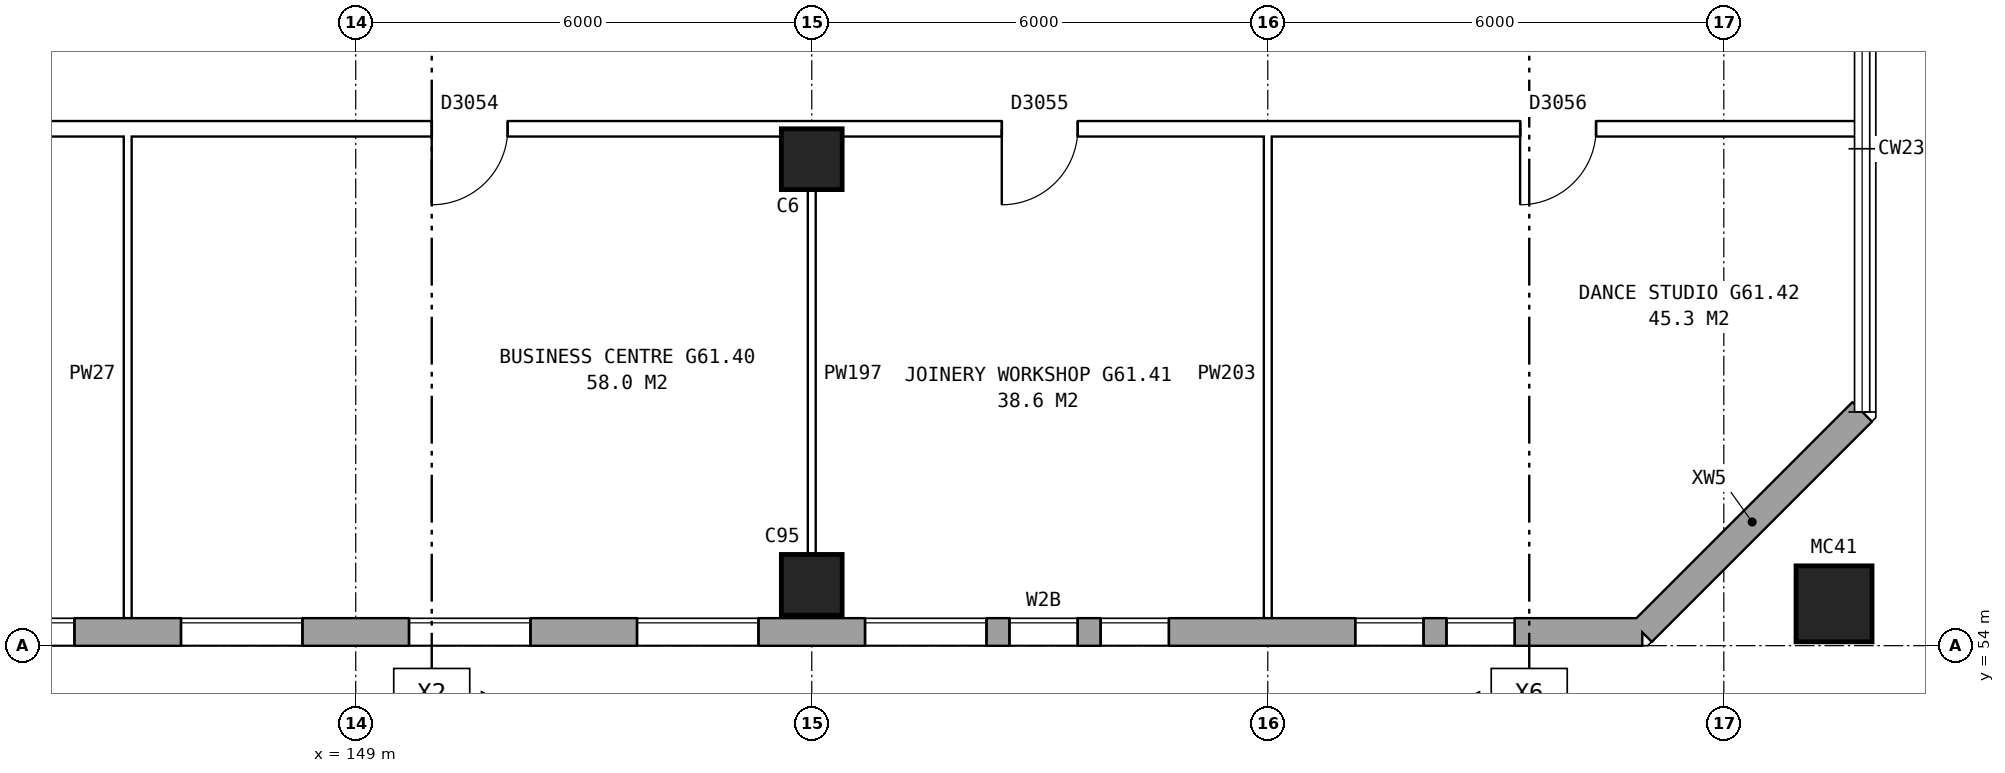
"""IFC4 building model, lengths in metres.
Left out: names, types, materials, properties, quantities, classifications, styles, units other than length and angle.
Written with IfcOpenShell. Run it as: python <this file> out.ifc"""

import sys

from ifc_helpers import new_model, si_unit, direction, frame, frame_2d, origin, origin_2d, place, context, subcontext, project, spatial, rectangle, hollow_rectangle, extrude, element, fill, save


model = new_model("IFC4")
c1 = context("Model", 3, precision=1e-05, world=origin(), true_north=direction((0.0, 1.0)))
c2 = subcontext(c1, "Body", "Model", "MODEL_VIEW")
j1 = project(units=[si_unit("LENGTHUNIT", "METRE"), si_unit("PLANEANGLEUNIT", "RADIAN")], contexts=[c1])
p1 = place(None, origin())
s1 = spatial("IfcSite", under=j1, at=p1, CompositionType="ELEMENT")
p2 = place(p1, origin())
s2 = spatial("IfcBuilding", under=s1, at=p2, CompositionType="ELEMENT")
p3 = place(p2, frame((0.0, 0.0, 215.2)))
s3 = spatial("IfcBuildingStorey", under=s2, at=p3, CompositionType="ELEMENT", Elevation=215.2)
for number, where, z_axis, x_axis in (
    (1, (155.0, 54.8, 0.0), (0.0, 0.0, 1.0), (1.0, 0.0, 0.0)),
    (2, (155.0, 60.4, 0.0), (0.0, 0.0, 1.0), (1.0, 0.0, 0.0)),
):
    element("IfcColumn", number, at=place(p3, frame(where, z_axis=z_axis, x_axis=x_axis)), inside=s3, PredefinedType="COLUMN", context=c2, shape_type="SweptSolid", body=[
        extrude(rectangle(XDim=0.8, YDim=0.8, at=origin_2d()), origin(), (0.0, 0.0, 1.0), 5.6),
    ])
p4 = place(p3, frame((168.45, 54.55, 0.0), z_axis=(0.0, 0.0, 1.0), x_axis=(1.0, 0.0, 0.0)))
e3 = element("IfcColumn", 3, at=p4, inside=s3, PredefinedType="COLUMN", context=c2, shape_type="SweptSolid", body=[
    extrude(hollow_rectangle(XDim=1.0, YDim=1.0, WallThickness=0.055, at=origin_2d()), origin(), (0.0, 0.0, 1.0), 6.2),
])
p5 = place(p3, frame((132.05, 54.18, 0.0), z_axis=(0.0, 0.0, 1.0), x_axis=(1.0, 0.0, 0.0)))
e4 = element("IfcWall", 4, at=p5, inside=s3, PredefinedType="STANDARD", context=c2, shape_type="SweptSolid", body=[
    extrude(rectangle(XDim=33.875, YDim=0.36, at=frame_2d((16.938, 0.0))), origin(), (0.0, 0.0, 1.0), 5.6),
])
p6 = place(p5, frame((2.65, 0.0, 0.15)))
e5 = element("IfcOpeningElement", 5, at=p6, cuts=e4, PredefinedType="OPENING", context=c2, shape_type="SweptSolid", body=[
    extrude(rectangle(XDim=1.6, YDim=2.4, at=frame_2d((0.8, 1.2))), frame((0.0, 0.19, 0.0), z_axis=(0.0, -1.0, 0.0), x_axis=(1.0, 0.0, 0.0)), (0.0, 0.0, 1.0), 0.38),
])
p7 = place(p5, frame((8.65, 0.0, 0.15)))
e6 = element("IfcOpeningElement", 6, at=p7, cuts=e4, PredefinedType="OPENING", context=c2, shape_type="SweptSolid", body=[
    extrude(rectangle(XDim=1.6, YDim=2.4, at=frame_2d((0.8, 1.2))), frame((0.0, 0.19, 0.0), z_axis=(0.0, -1.0, 0.0), x_axis=(1.0, 0.0, 0.0)), (0.0, 0.0, 1.0), 0.38),
])
p8 = place(p5, frame((11.65, 0.0, 0.15)))
e7 = element("IfcOpeningElement", 7, at=p8, cuts=e4, PredefinedType="OPENING", context=c2, shape_type="SweptSolid", body=[
    extrude(rectangle(XDim=1.6, YDim=2.4, at=frame_2d((0.8, 1.2))), frame((0.0, 0.19, 0.0), z_axis=(0.0, -1.0, 0.0), x_axis=(1.0, 0.0, 0.0)), (0.0, 0.0, 1.0), 0.38),
])
p9 = place(p5, frame((14.65, 0.0, 0.15)))
e8 = element("IfcOpeningElement", 8, at=p9, cuts=e4, PredefinedType="OPENING", context=c2, shape_type="SweptSolid", body=[
    extrude(rectangle(XDim=1.6, YDim=2.4, at=frame_2d((0.8, 1.2))), frame((0.0, 0.19, 0.0), z_axis=(0.0, -1.0, 0.0), x_axis=(1.0, 0.0, 0.0)), (0.0, 0.0, 1.0), 0.38),
])
p10 = place(p5, frame((17.65, 0.0, 0.15)))
e9 = element("IfcOpeningElement", 9, at=p10, cuts=e4, PredefinedType="OPENING", context=c2, shape_type="SweptSolid", body=[
    extrude(rectangle(XDim=1.6, YDim=2.4, at=frame_2d((0.8, 1.2))), frame((0.0, 0.19, 0.0), z_axis=(0.0, -1.0, 0.0), x_axis=(1.0, 0.0, 0.0)), (0.0, 0.0, 1.0), 0.38),
])
p11 = place(p5, frame((20.65, 0.0, 0.15)))
e10 = element("IfcOpeningElement", 10, at=p11, cuts=e4, PredefinedType="OPENING", context=c2, shape_type="SweptSolid", body=[
    extrude(rectangle(XDim=1.6, YDim=2.4, at=frame_2d((0.8, 1.2))), frame((0.0, 0.19, 0.0), z_axis=(0.0, -1.0, 0.0), x_axis=(1.0, 0.0, 0.0)), (0.0, 0.0, 1.0), 0.38),
])
p12 = place(p5, frame((23.65, 0.0, 0.15)))
e11 = element("IfcOpeningElement", 11, at=p12, cuts=e4, PredefinedType="OPENING", context=c2, shape_type="SweptSolid", body=[
    extrude(rectangle(XDim=1.6, YDim=2.4, at=frame_2d((0.8, 1.2))), frame((0.0, 0.19, 0.0), z_axis=(0.0, -1.0, 0.0), x_axis=(1.0, 0.0, 0.0)), (0.0, 0.0, 1.0), 0.38),
])
p13 = place(p5, frame((25.55, 0.0, 0.15)))
e12 = element("IfcOpeningElement", 12, at=p13, cuts=e4, PredefinedType="OPENING", context=c2, shape_type="SweptSolid", body=[
    extrude(rectangle(XDim=0.9, YDim=2.4, at=frame_2d((0.45, 1.2))), frame((0.0, 0.19, 0.0), z_axis=(0.0, -1.0, 0.0), x_axis=(1.0, 0.0, 0.0)), (0.0, 0.0, 1.0), 0.38),
])
p14 = place(p5, frame((30.1, 0.0, 0.15)))
e13 = element("IfcOpeningElement", 13, at=p14, cuts=e4, PredefinedType="OPENING", context=c2, shape_type="SweptSolid", body=[
    extrude(rectangle(XDim=0.9, YDim=2.4, at=frame_2d((0.45, 1.2))), frame((0.0, 0.19, 0.0), z_axis=(0.0, -1.0, 0.0), x_axis=(1.0, 0.0, 0.0)), (0.0, 0.0, 1.0), 0.38),
])
p15 = place(p5, frame((26.75, 0.0, 0.15)))
e14 = element("IfcOpeningElement", 14, at=p15, cuts=e4, PredefinedType="OPENING", context=c2, shape_type="SweptSolid", body=[
    extrude(rectangle(XDim=0.9, YDim=2.4, at=frame_2d((0.45, 1.2))), frame((0.0, 0.19, 0.0), z_axis=(0.0, -1.0, 0.0), x_axis=(1.0, 0.0, 0.0)), (0.0, 0.0, 1.0), 0.38),
])
p16 = place(p5, frame((31.3, 0.0, 0.15)))
e15 = element("IfcOpeningElement", 15, at=p16, cuts=e4, PredefinedType="OPENING", context=c2, shape_type="SweptSolid", body=[
    extrude(rectangle(XDim=0.9, YDim=2.4, at=frame_2d((0.45, 1.2))), frame((0.0, 0.19, 0.0), z_axis=(0.0, -1.0, 0.0), x_axis=(1.0, 0.0, 0.0)), (0.0, 0.0, 1.0), 0.38),
])
p17 = place(p3, frame((165.925, 54.18, 0.0), z_axis=(0.0, 0.0, 1.0), x_axis=(0.707106781187, 0.707106781187, 0.0)))
e16 = element("IfcWall", 16, at=p17, inside=s3, PredefinedType="STANDARD", context=c2, shape_type="SweptSolid", body=[
    extrude(rectangle(XDim=4.094, YDim=0.36, at=frame_2d((2.047, 0.0))), origin(), (0.0, 0.0, 1.0), 5.6),
])
p18 = place(p3, frame((32.24, 60.8, 0.0), z_axis=(0.0, 0.0, 1.0), x_axis=(1.0, 0.0, 0.0)))
e17 = element("IfcWall", 17, at=p18, inside=s3, PredefinedType="PARTITIONING", context=c2, shape_type="SweptSolid", body=[
    extrude(rectangle(XDim=136.52, YDim=0.2, at=frame_2d((68.26, 0.0))), origin(), (0.0, 0.0, 1.0), 5.6),
])
p19 = place(p18, frame((3.44, 0.0, 0.0)))
e18 = element("IfcOpeningElement", 18, at=p19, cuts=e17, PredefinedType="OPENING", context=c2, shape_type="SweptSolid", body=[
    extrude(rectangle(XDim=1.0, YDim=2.1, at=frame_2d((0.5, 1.05))), frame((0.0, 0.11, 0.0), z_axis=(0.0, -1.0, 0.0), x_axis=(1.0, 0.0, 0.0)), (0.0, 0.0, 1.0), 0.22),
])
p20 = place(p18, frame((11.76, 0.0, 0.0)))
e19 = element("IfcOpeningElement", 19, at=p20, cuts=e17, PredefinedType="OPENING", context=c2, shape_type="SweptSolid", body=[
    extrude(rectangle(XDim=1.0, YDim=2.1, at=frame_2d((0.5, 1.05))), frame((0.0, 0.11, 0.0), z_axis=(0.0, -1.0, 0.0), x_axis=(1.0, 0.0, 0.0)), (0.0, 0.0, 1.0), 0.22),
])
p21 = place(p18, frame((20.76, 0.0, 0.0)))
e20 = element("IfcOpeningElement", 20, at=p21, cuts=e17, PredefinedType="OPENING", context=c2, shape_type="SweptSolid", body=[
    extrude(rectangle(XDim=1.0, YDim=2.1, at=frame_2d((0.5, 1.05))), frame((0.0, 0.11, 0.0), z_axis=(0.0, -1.0, 0.0), x_axis=(1.0, 0.0, 0.0)), (0.0, 0.0, 1.0), 0.22),
])
p22 = place(p18, frame((29.76, 0.0, 0.0)))
e21 = element("IfcOpeningElement", 21, at=p22, cuts=e17, PredefinedType="OPENING", context=c2, shape_type="SweptSolid", body=[
    extrude(rectangle(XDim=1.0, YDim=2.1, at=frame_2d((0.5, 1.05))), frame((0.0, 0.11, 0.0), z_axis=(0.0, -1.0, 0.0), x_axis=(1.0, 0.0, 0.0)), (0.0, 0.0, 1.0), 0.22),
])
p23 = place(p18, frame((38.58, 0.0, 0.0)))
e22 = element("IfcOpeningElement", 22, at=p23, cuts=e17, PredefinedType="OPENING", context=c2, shape_type="SweptSolid", body=[
    extrude(rectangle(XDim=1.0, YDim=2.1, at=frame_2d((0.5, 1.05))), frame((0.0, 0.11, 0.0), z_axis=(0.0, -1.0, 0.0), x_axis=(1.0, 0.0, 0.0)), (0.0, 0.0, 1.0), 0.22),
])
p24 = place(p18, frame((49.955, 0.0, 0.0)))
e23 = element("IfcOpeningElement", 23, at=p24, cuts=e17, PredefinedType="OPENING", context=c2, shape_type="SweptSolid", body=[
    extrude(rectangle(XDim=1.0, YDim=2.1, at=frame_2d((0.5, 1.05))), frame((0.0, 0.11, 0.0), z_axis=(0.0, -1.0, 0.0), x_axis=(1.0, 0.0, 0.0)), (0.0, 0.0, 1.0), 0.22),
])
p25 = place(p18, frame((63.885, 0.0, 0.0)))
e24 = element("IfcOpeningElement", 24, at=p25, cuts=e17, PredefinedType="OPENING", context=c2, shape_type="SweptSolid", body=[
    extrude(rectangle(XDim=1.0, YDim=2.1, at=frame_2d((0.5, 1.05))), frame((0.0, 0.11, 0.0), z_axis=(0.0, -1.0, 0.0), x_axis=(1.0, 0.0, 0.0)), (0.0, 0.0, 1.0), 0.22),
])
p26 = place(p18, frame((77.635, 0.0, 0.0)))
e25 = element("IfcOpeningElement", 25, at=p26, cuts=e17, PredefinedType="OPENING", context=c2, shape_type="SweptSolid", body=[
    extrude(rectangle(XDim=1.0, YDim=2.1, at=frame_2d((0.5, 1.05))), frame((0.0, 0.11, 0.0), z_axis=(0.0, -1.0, 0.0), x_axis=(1.0, 0.0, 0.0)), (0.0, 0.0, 1.0), 0.22),
])
p27 = place(p18, frame((91.565, 0.0, 0.0)))
e26 = element("IfcOpeningElement", 26, at=p27, cuts=e17, PredefinedType="OPENING", context=c2, shape_type="SweptSolid", body=[
    extrude(rectangle(XDim=1.0, YDim=2.1, at=frame_2d((0.5, 1.05))), frame((0.0, 0.11, 0.0), z_axis=(0.0, -1.0, 0.0), x_axis=(1.0, 0.0, 0.0)), (0.0, 0.0, 1.0), 0.22),
])
p28 = place(p18, frame((101.44, 0.0, 0.0)))
e27 = element("IfcOpeningElement", 27, at=p28, cuts=e17, PredefinedType="OPENING", context=c2, shape_type="SweptSolid", body=[
    extrude(rectangle(XDim=1.0, YDim=2.1, at=frame_2d((0.5, 1.05))), frame((0.0, 0.11, 0.0), z_axis=(0.0, -1.0, 0.0), x_axis=(1.0, 0.0, 0.0)), (0.0, 0.0, 1.0), 0.22),
])
p29 = place(p18, frame((108.76, 0.0, 0.0)))
e28 = element("IfcOpeningElement", 28, at=p29, cuts=e17, PredefinedType="OPENING", context=c2, shape_type="SweptSolid", body=[
    extrude(rectangle(XDim=1.0, YDim=2.1, at=frame_2d((0.5, 1.05))), frame((0.0, 0.11, 0.0), z_axis=(0.0, -1.0, 0.0), x_axis=(1.0, 0.0, 0.0)), (0.0, 0.0, 1.0), 0.22),
])
p30 = place(p18, frame((117.76, 0.0, 0.0)))
e29 = element("IfcOpeningElement", 29, at=p30, cuts=e17, PredefinedType="OPENING", context=c2, shape_type="SweptSolid", body=[
    extrude(rectangle(XDim=1.0, YDim=2.1, at=frame_2d((0.5, 1.05))), frame((0.0, 0.11, 0.0), z_axis=(0.0, -1.0, 0.0), x_axis=(1.0, 0.0, 0.0)), (0.0, 0.0, 1.0), 0.22),
])
p31 = place(p18, frame((125.26, 0.0, 0.0)))
e30 = element("IfcOpeningElement", 30, at=p31, cuts=e17, PredefinedType="OPENING", context=c2, shape_type="SweptSolid", body=[
    extrude(rectangle(XDim=1.0, YDim=2.1, at=frame_2d((0.5, 1.05))), frame((0.0, 0.11, 0.0), z_axis=(0.0, -1.0, 0.0), x_axis=(1.0, 0.0, 0.0)), (0.0, 0.0, 1.0), 0.22),
])
p32 = place(p18, frame((132.08, 0.0, 0.0)))
e31 = element("IfcOpeningElement", 31, at=p32, cuts=e17, PredefinedType="OPENING", context=c2, shape_type="SweptSolid", body=[
    extrude(rectangle(XDim=1.0, YDim=2.1, at=frame_2d((0.5, 1.05))), frame((0.0, 0.11, 0.0), z_axis=(0.0, -1.0, 0.0), x_axis=(1.0, 0.0, 0.0)), (0.0, 0.0, 1.0), 0.22),
])
for number, where, z_axis, x_axis in (
    (32, (146.0, 54.24, 0.0), (0.0, 0.0, 1.0), (0.0, 1.0, 0.0)),
    (33, (155.0, 54.24, 0.0), (0.0, 0.0, 1.0), (0.0, 1.0, 0.0)),
    (34, (161.0, 54.24, 0.0), (0.0, 0.0, 1.0), (0.0, 1.0, 0.0)),
):
    element("IfcWall", number, at=place(p3, frame(where, z_axis=z_axis, x_axis=x_axis)), inside=s3, PredefinedType="PARTITIONING", context=c2, shape_type="SweptSolid", body=[
        extrude(rectangle(XDim=6.66, YDim=0.1, at=frame_2d((3.33, 0.0))), origin(), (0.0, 0.0, 1.0), 5.6),
    ])
p33 = place(p8, origin())
e35 = element("IfcWindow", 35, at=p33, inside=s3, PartitioningType="SINGLE_PANEL", PredefinedType="WINDOW", context=c2, shape_type="SweptSolid", body=[
    extrude(rectangle(XDim=1.6, YDim=2.4, at=frame_2d((0.8, 1.2))), frame((0.0, 0.15, 0.0), z_axis=(0.0, -1.0, 0.0), x_axis=(1.0, 0.0, 0.0)), (0.0, 0.0, 1.0), 0.06),
])
fill(e7, e35)
p34 = place(p9, origin())
e36 = element("IfcWindow", 36, at=p34, inside=s3, PartitioningType="SINGLE_PANEL", PredefinedType="WINDOW", context=c2, shape_type="SweptSolid", body=[
    extrude(rectangle(XDim=1.6, YDim=2.4, at=frame_2d((0.8, 1.2))), frame((0.0, 0.15, 0.0), z_axis=(0.0, -1.0, 0.0), x_axis=(1.0, 0.0, 0.0)), (0.0, 0.0, 1.0), 0.06),
])
fill(e8, e36)
p35 = place(p10, origin())
e37 = element("IfcWindow", 37, at=p35, inside=s3, PartitioningType="SINGLE_PANEL", PredefinedType="WINDOW", context=c2, shape_type="SweptSolid", body=[
    extrude(rectangle(XDim=1.6, YDim=2.4, at=frame_2d((0.8, 1.2))), frame((0.0, 0.15, 0.0), z_axis=(0.0, -1.0, 0.0), x_axis=(1.0, 0.0, 0.0)), (0.0, 0.0, 1.0), 0.06),
])
fill(e9, e37)
p36 = place(p11, origin())
e38 = element("IfcWindow", 38, at=p36, inside=s3, PartitioningType="SINGLE_PANEL", PredefinedType="WINDOW", context=c2, shape_type="SweptSolid", body=[
    extrude(rectangle(XDim=1.6, YDim=2.4, at=frame_2d((0.8, 1.2))), frame((0.0, 0.15, 0.0), z_axis=(0.0, -1.0, 0.0), x_axis=(1.0, 0.0, 0.0)), (0.0, 0.0, 1.0), 0.06),
])
fill(e10, e38)
p37 = place(p12, origin())
e39 = element("IfcWindow", 39, at=p37, inside=s3, PartitioningType="SINGLE_PANEL", PredefinedType="WINDOW", context=c2, shape_type="SweptSolid", body=[
    extrude(rectangle(XDim=1.6, YDim=2.4, at=frame_2d((0.8, 1.2))), frame((0.0, 0.15, 0.0), z_axis=(0.0, -1.0, 0.0), x_axis=(1.0, 0.0, 0.0)), (0.0, 0.0, 1.0), 0.06),
])
fill(e11, e39)
p38 = place(p13, origin())
e40 = element("IfcWindow", 40, at=p38, inside=s3, PartitioningType="SINGLE_PANEL", PredefinedType="WINDOW", context=c2, shape_type="SweptSolid", body=[
    extrude(rectangle(XDim=0.9, YDim=2.4, at=frame_2d((0.45, 1.2))), frame((0.0, 0.15, 0.0), z_axis=(0.0, -1.0, 0.0), x_axis=(1.0, 0.0, 0.0)), (0.0, 0.0, 1.0), 0.06),
])
fill(e12, e40)
p39 = place(p14, origin())
e41 = element("IfcWindow", 41, at=p39, inside=s3, PartitioningType="SINGLE_PANEL", PredefinedType="WINDOW", context=c2, shape_type="SweptSolid", body=[
    extrude(rectangle(XDim=0.9, YDim=2.4, at=frame_2d((0.45, 1.2))), frame((0.0, 0.15, 0.0), z_axis=(0.0, -1.0, 0.0), x_axis=(1.0, 0.0, 0.0)), (0.0, 0.0, 1.0), 0.06),
])
fill(e13, e41)
p40 = place(p30, frame((1.0, 0.0, 0.0), z_axis=(0.0, 0.0, 1.0), x_axis=(-1.0, 0.0, 0.0)))
e42 = element("IfcDoor", 42, at=p40, inside=s3, OperationType="SINGLE_SWING_RIGHT", PredefinedType="DOOR", context=c2, shape_type="SweptSolid", body=[
    extrude(rectangle(XDim=1.0, YDim=2.1, at=frame_2d((0.5, 1.05))), frame((0.0, 0.025, 0.0), z_axis=(0.0, -1.0, 0.0), x_axis=(1.0, 0.0, 0.0)), (0.0, 0.0, 1.0), 0.05),
])
fill(e29, e42)
p41 = place(p31, frame((1.0, 0.0, 0.0), z_axis=(0.0, 0.0, 1.0), x_axis=(-1.0, 0.0, 0.0)))
e43 = element("IfcDoor", 43, at=p41, inside=s3, OperationType="SINGLE_SWING_RIGHT", PredefinedType="DOOR", context=c2, shape_type="SweptSolid", body=[
    extrude(rectangle(XDim=1.0, YDim=2.1, at=frame_2d((0.5, 1.05))), frame((0.0, 0.025, 0.0), z_axis=(0.0, -1.0, 0.0), x_axis=(1.0, 0.0, 0.0)), (0.0, 0.0, 1.0), 0.05),
])
fill(e30, e43)
p42 = place(p32, frame((1.0, 0.0, 0.0), z_axis=(0.0, 0.0, 1.0), x_axis=(-1.0, 0.0, 0.0)))
e44 = element("IfcDoor", 44, at=p42, inside=s3, OperationType="SINGLE_SWING_RIGHT", PredefinedType="DOOR", context=c2, shape_type="SweptSolid", body=[
    extrude(rectangle(XDim=1.0, YDim=2.1, at=frame_2d((0.5, 1.05))), frame((0.0, 0.025, 0.0), z_axis=(0.0, -1.0, 0.0), x_axis=(1.0, 0.0, 0.0)), (0.0, 0.0, 1.0), 0.05),
])
fill(e31, e44)
p43 = place(p15, origin())
e45 = element("IfcWindow", 45, at=p43, inside=s3, PartitioningType="SINGLE_PANEL", PredefinedType="WINDOW", context=c2, shape_type="SweptSolid", body=[
    extrude(rectangle(XDim=0.9, YDim=2.4, at=frame_2d((0.45, 1.2))), frame((0.0, 0.15, 0.0), z_axis=(0.0, -1.0, 0.0), x_axis=(1.0, 0.0, 0.0)), (0.0, 0.0, 1.0), 0.06),
])
fill(e14, e45)
p44 = place(p16, origin())
e46 = element("IfcWindow", 46, at=p44, inside=s3, PartitioningType="SINGLE_PANEL", PredefinedType="WINDOW", context=c2, shape_type="SweptSolid", body=[
    extrude(rectangle(XDim=0.9, YDim=2.4, at=frame_2d((0.45, 1.2))), frame((0.0, 0.15, 0.0), z_axis=(0.0, -1.0, 0.0), x_axis=(1.0, 0.0, 0.0)), (0.0, 0.0, 1.0), 0.06),
])
fill(e15, e46)
save(model, sys.argv[1])
